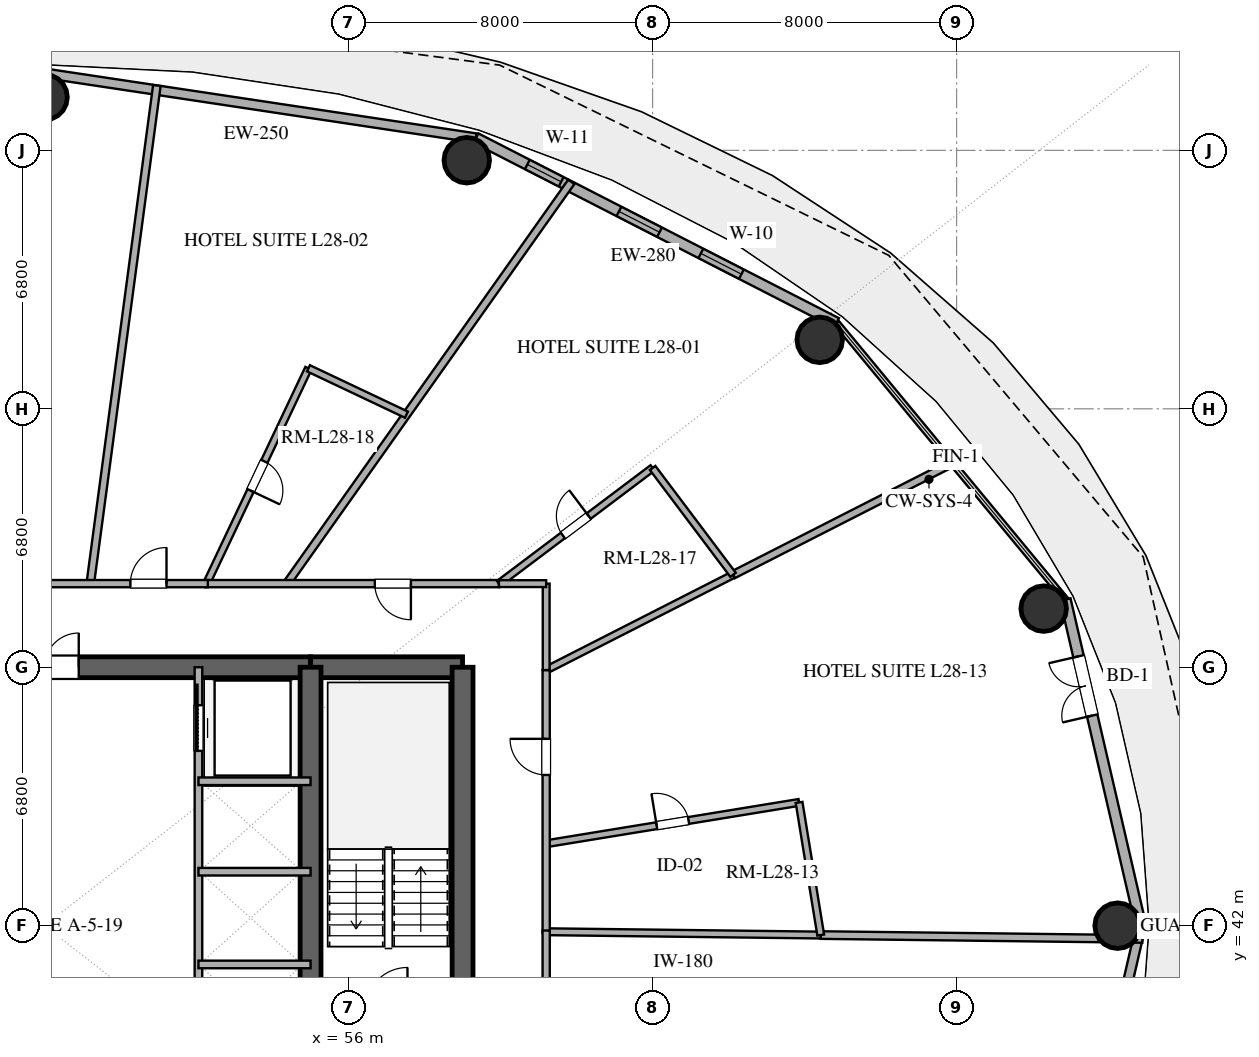
"""IFC4 building model, lengths in metres.
Left out: names, types, materials, properties, quantities, classifications, styles, units other than length and angle.
Written with IfcOpenShell. Run it as: python <this file> out.ifc"""

import sys

from ifc_helpers import new_model, si_unit, direction, frame, frame_2d, origin, origin_2d, place, context, subcontext, project, spatial, rectangle, hollow_circle, extrude, element, fill, save


model = new_model("IFC4")
c1 = context("Model", 3, precision=1e-05, world=origin(), true_north=direction((0.0, 1.0)))
c2 = subcontext(c1, "Body", "Model", "MODEL_VIEW")
j1 = project(units=[si_unit("LENGTHUNIT", "METRE"), si_unit("PLANEANGLEUNIT", "RADIAN")], contexts=[c1])
p1 = place(None, origin())
s1 = spatial("IfcSite", under=j1, at=p1, CompositionType="ELEMENT")
p2 = place(p1, origin())
s2 = spatial("IfcBuilding", under=s1, at=p2, CompositionType="ELEMENT")
p3 = place(p2, frame((0.0, 0.0, 112.8)))
s3 = spatial("IfcBuildingStorey", under=s2, at=p3, CompositionType="ELEMENT", Elevation=112.8)
p4 = place(p3, frame((41.0, 48.8, 0.0), z_axis=(0.0, 0.0, 1.0), x_axis=(1.0, 0.0, 0.0)))
e1 = element("IfcWall", 1, at=p4, inside=s3, PredefinedType="SHEAR", context=c2, shape_type="SweptSolid", body=[
    extrude(rectangle(XDim=14.0, YDim=0.55, at=frame_2d((7.0, 0.0))), origin(), (0.0, 0.0, 1.0), 3.38),
])
p5 = place(p4, frame((6.1, 0.0, 0.0)))
e2 = element("IfcOpeningElement", 2, at=p5, cuts=e1, PredefinedType="OPENING", context=c2, shape_type="SweptSolid", body=[
    extrude(rectangle(XDim=1.8, YDim=2.25, at=frame_2d((0.9, 1.125))), frame((0.0, 0.285, 0.0), z_axis=(0.0, -1.0, 0.0), x_axis=(1.0, 0.0, 0.0)), (0.0, 0.0, 1.0), 0.57),
])
p6 = place(p3, frame((55.0, 48.8, 0.0), z_axis=(0.0, 0.0, 1.0), x_axis=(1.0, 0.0, 0.0)))
e3 = element("IfcWall", 3, at=p6, inside=s3, PredefinedType="SHEAR", context=c2, shape_type="SweptSolid", body=[
    extrude(rectangle(XDim=4.0, YDim=0.55, at=frame_2d((2.0, 0.0))), origin(), (0.0, 0.0, 1.0), 3.38),
])
p7 = place(p3, frame((59.0, 35.2, 0.0), z_axis=(0.0, 0.0, 1.0), x_axis=(0.0, 1.0, 0.0)))
e4 = element("IfcWall", 4, at=p7, inside=s3, PredefinedType="SHEAR", context=c2, shape_type="SweptSolid", body=[
    extrude(rectangle(XDim=13.6, YDim=0.55, at=frame_2d((6.8, 0.0))), origin(), (0.0, 0.0, 1.0), 3.38),
])
p8 = place(p7, frame((1.5, 0.0, 0.0)))
e5 = element("IfcOpeningElement", 5, at=p8, cuts=e4, PredefinedType="OPENING", context=c2, shape_type="SweptSolid", body=[
    extrude(rectangle(XDim=1.2, YDim=2.15, at=frame_2d((0.6, 1.075))), frame((0.0, 0.285, 0.0), z_axis=(0.0, -1.0, 0.0), x_axis=(1.0, 0.0, 0.0)), (0.0, 0.0, 1.0), 0.57),
])
p9 = place(p3, frame((55.0, 35.2, 0.0), z_axis=(0.0, 0.0, 1.0), x_axis=(0.0, 1.0, 0.0)))
e6 = element("IfcWall", 6, at=p9, inside=s3, PredefinedType="SHEAR", context=c2, shape_type="SweptSolid", body=[
    extrude(rectangle(XDim=13.6, YDim=0.55, at=frame_2d((6.8, 0.0))), origin(), (0.0, 0.0, 1.0), 3.38),
])
p10 = place(p9, frame((1.15, 0.0, 0.0)))
e7 = element("IfcOpeningElement", 7, at=p10, cuts=e6, PredefinedType="OPENING", context=c2, shape_type="SweptSolid", body=[
    extrude(rectangle(XDim=1.1, YDim=2.2, at=frame_2d((0.55, 1.1))), frame((0.0, 0.285, 0.0), z_axis=(0.0, -1.0, 0.0), x_axis=(1.0, 0.0, 0.0)), (0.0, 0.0, 1.0), 0.57),
])
for number, where, z_axis, x_axis in (
    (8, (76.237, 42.0, 0.0), (0.0, 0.0, 1.0), (1.0, 0.0, 0.0)),
    (9, (74.291, 50.343, 0.0), (0.0, 0.0, 1.0), (1.0, 0.0, 0.0)),
    (10, (68.398, 57.415, 0.0), (0.0, 0.0, 1.0), (1.0, 0.0, 0.0)),
    (11, (59.11, 62.141, 0.0), (0.0, 0.0, 1.0), (1.0, 0.0, 0.0)),
    (12, (48.0, 63.8, 0.0), (0.0, 0.0, 1.0), (1.0, 0.0, 0.0)),
):
    element("IfcColumn", number, at=place(p3, frame(where, z_axis=z_axis, x_axis=x_axis)), inside=s3, PredefinedType="COLUMN", context=c2, shape_type="SweptSolid", body=[
        extrude(hollow_circle(Radius=0.6, WallThickness=0.032, at=origin_2d()), origin(), (0.0, 0.0, 1.0), 3.38),
    ])
p11 = place(p3, frame((76.849, 42.0, 0.0), z_axis=(0.0, 0.0, 1.0), x_axis=(-0.22558597182, 0.974223264616, 0.0)))
e13 = element("IfcWall", 13, at=p11, inside=s3, PredefinedType="SOLIDWALL", context=c2, shape_type="SweptSolid", body=[
    extrude(rectangle(XDim=8.811, YDim=0.28, at=frame_2d((4.405, 0.0))), origin(), (0.0, 0.0, 1.0), 3.38),
])
p12 = place(p11, frame((5.675, 0.0, 0.0)))
e14 = element("IfcOpeningElement", 14, at=p12, cuts=e13, PredefinedType="OPENING", context=c2, shape_type="SweptSolid", body=[
    extrude(rectangle(XDim=1.6, YDim=2.25, at=frame_2d((0.8, 1.125))), frame((0.0, 0.15, 0.0), z_axis=(0.0, -1.0, 0.0), x_axis=(1.0, 0.0, 0.0)), (0.0, 0.0, 1.0), 0.3),
])
p13 = place(p3, frame((68.84, 57.86, 0.0), z_axis=(0.0, 0.0, 1.0), x_axis=(-0.889959505023, 0.45603955905, 0.0)))
e15 = element("IfcWall", 15, at=p13, inside=s3, PredefinedType="SOLIDWALL", context=c2, shape_type="SweptSolid", body=[
    extrude(rectangle(XDim=10.662, YDim=0.28, at=frame_2d((5.331, 0.0))), origin(), (0.0, 0.0, 1.0), 3.38),
])
p14 = place(p13, frame((2.811, 0.0, 0.85)))
e16 = element("IfcOpeningElement", 16, at=p14, cuts=e15, PredefinedType="OPENING", context=c2, shape_type="SweptSolid", body=[
    extrude(rectangle(XDim=1.2, YDim=1.6, at=frame_2d((0.6, 0.8))), frame((0.0, 0.15, 0.0), z_axis=(0.0, -1.0, 0.0), x_axis=(1.0, 0.0, 0.0)), (0.0, 0.0, 1.0), 0.3),
])
p15 = place(p13, frame((5.232, 0.0, 0.85)))
e17 = element("IfcOpeningElement", 17, at=p15, cuts=e15, PredefinedType="OPENING", context=c2, shape_type="SweptSolid", body=[
    extrude(rectangle(XDim=1.2, YDim=1.6, at=frame_2d((0.6, 0.8))), frame((0.0, 0.15, 0.0), z_axis=(0.0, -1.0, 0.0), x_axis=(1.0, 0.0, 0.0)), (0.0, 0.0, 1.0), 0.3),
])
p16 = place(p13, frame((8.142, 0.0, 0.85)))
e18 = element("IfcOpeningElement", 18, at=p16, cuts=e15, PredefinedType="OPENING", context=c2, shape_type="SweptSolid", body=[
    extrude(rectangle(XDim=1.0, YDim=1.8, at=frame_2d((0.5, 0.9))), frame((0.0, 0.15, 0.0), z_axis=(0.0, -1.0, 0.0), x_axis=(1.0, 0.0, 0.0)), (0.0, 0.0, 1.0), 0.3),
])
p17 = place(p3, frame((59.351, 62.723, 0.0), z_axis=(0.0, 0.0, 1.0), x_axis=(-0.988877774656, 0.148730450117, 0.0)))
e19 = element("IfcWall", 19, at=p17, inside=s3, PredefinedType="SOLIDWALL", context=c2, shape_type="SweptSolid", body=[
    extrude(rectangle(XDim=11.479, YDim=0.25, at=frame_2d((5.74, 0.0))), origin(), (0.0, 0.0, 1.0), 3.38),
])
p18 = place(p3, frame((74.861, 33.417, 0.0), z_axis=(0.0, 0.0, 1.0), x_axis=(0.22558597182, 0.974223264616, 0.0)))
e20 = element("IfcWall", 20, at=p18, inside=s3, PredefinedType="SOLIDWALL", context=c2, shape_type="SweptSolid", body=[
    extrude(rectangle(XDim=8.811, YDim=0.25, at=frame_2d((4.405, 0.0))), origin(), (0.0, 0.0, 1.0), 3.38),
])
p19 = place(p3, frame((52.05, 38.4, 0.0), z_axis=(0.0, 0.0, 1.0), x_axis=(0.0, 1.0, 0.0)))
e21 = element("IfcWall", 21, at=p19, inside=s3, PredefinedType="SOLIDWALL", context=c2, shape_type="SweptSolid", body=[
    extrude(rectangle(XDim=10.4, YDim=0.2, at=frame_2d((5.2, 0.0))), origin(), (0.0, 0.0, 1.0), 2.74),
])
p20 = place(p19, frame((8.2, 0.0, 0.0)))
e22 = element("IfcOpeningElement", 22, at=p20, cuts=e21, PredefinedType="OPENING", context=c2, shape_type="SweptSolid", body=[
    extrude(rectangle(XDim=1.2, YDim=2.2, at=frame_2d((0.6, 1.1))), frame((0.0, 0.11, 0.0), z_axis=(0.0, -1.0, 0.0), x_axis=(1.0, 0.0, 0.0)), (0.0, 0.0, 1.0), 0.22),
])
for number, where, z_axis, x_axis in (
    (23, (52.05, 40.98, 0.0), (0.0, 0.0, 1.0), (1.0, 0.0, 0.0)),
    (24, (52.05, 43.42, 0.0), (0.0, 0.0, 1.0), (1.0, 0.0, 0.0)),
    (25, (52.05, 45.8, 0.0), (0.0, 0.0, 1.0), (1.0, 0.0, 0.0)),
):
    element("IfcWall", number, at=place(p3, frame(where, z_axis=z_axis, x_axis=x_axis)), inside=s3, PredefinedType="SOLIDWALL", context=c2, shape_type="SweptSolid", body=[
        extrude(rectangle(XDim=2.95, YDim=0.2, at=frame_2d((1.475, 0.0))), origin(), (0.0, 0.0, 1.0), 2.74),
    ])
p21 = place(p3, frame((50.956, 64.107, 0.0), z_axis=(0.0, 0.0, 1.0), x_axis=(-0.132526518831, -0.99117945994, 0.0)))
e26 = element("IfcWall", 26, at=p21, inside=s3, PredefinedType="PARTITIONING", context=c2, shape_type="SweptSolid", body=[
    extrude(rectangle(XDim=13.223, YDim=0.2, at=frame_2d((6.612, 0.0))), origin(), (0.0, 0.0, 1.0), 2.74),
])
p22 = place(p3, frame((76.888, 41.651, 0.0), z_axis=(0.0, 0.0, 1.0), x_axis=(-0.9999269672, 0.012085539541, 0.0)))
e27 = element("IfcWall", 27, at=p22, inside=s3, PredefinedType="PARTITIONING", context=c2, shape_type="SweptSolid", body=[
    extrude(rectangle(XDim=8.464, YDim=0.2, at=frame_2d((4.232, 0.0))), origin(), (0.0, 0.0, 1.0), 2.74),
])
p23 = place(p3, frame((54.374, 51.0, 0.0), z_axis=(0.0, 0.0, 1.0), x_axis=(0.577967135411, 0.816060040919, 0.0)))
e28 = element("IfcWall", 28, at=p23, inside=s3, PredefinedType="PARTITIONING", context=c2, shape_type="SweptSolid", body=[
    extrude(rectangle(XDim=12.953, YDim=0.2, at=frame_2d((6.477, 0.0))), origin(), (0.0, 0.0, 1.0), 2.74),
])
p24 = place(p3, frame((68.425, 41.753, 0.0), z_axis=(0.0, 0.0, 1.0), x_axis=(-0.999926833816, 0.012096570355, 0.0)))
e29 = element("IfcWall", 29, at=p24, inside=s3, PredefinedType="PLUMBINGWALL", context=c2, shape_type="SweptSolid", body=[
    extrude(rectangle(XDim=7.225, YDim=0.18, at=frame_2d((3.613, 0.0))), origin(), (0.0, 0.0, 1.0), 2.74),
])
p25 = place(p3, frame((61.2, 44.156, 0.0), z_axis=(0.0, 0.0, 1.0), x_axis=(0.986917247844, 0.161227621419, 0.0)))
e30 = element("IfcWall", 30, at=p25, inside=s3, PredefinedType="PLUMBINGWALL", context=c2, shape_type="SweptSolid", body=[
    extrude(rectangle(XDim=6.743, YDim=0.18, at=frame_2d((3.372, 0.0))), origin(), (0.0, 0.0, 1.0), 2.74),
])
p26 = place(p25, frame((2.946, 0.0, 0.0)))
e31 = element("IfcOpeningElement", 31, at=p26, cuts=e30, PredefinedType="OPENING", context=c2, shape_type="SweptSolid", body=[
    extrude(rectangle(XDim=0.85, YDim=2.1, at=frame_2d((0.425, 1.05))), frame((0.0, 0.1, 0.0), z_axis=(0.0, -1.0, 0.0), x_axis=(1.0, 0.0, 0.0)), (0.0, 0.0, 1.0), 0.2),
])
p27 = place(p3, frame((71.998, 54.228, 0.0), z_axis=(0.0, 0.0, 1.0), x_axis=(-0.891005333778, -0.453992836044, 0.0)))
e32 = element("IfcWall", 32, at=p27, inside=s3, PredefinedType="PARTITIONING", context=c2, shape_type="SweptSolid", body=[
    extrude(rectangle(XDim=6.599, YDim=0.2, at=frame_2d((3.3, 0.0))), origin(), (0.0, 0.0, 1.0), 2.74),
])
p28 = place(p3, frame((54.945, 56.666, 0.0), z_axis=(0.0, 0.0, 1.0), x_axis=(-0.427935680108, -0.903809190975, 0.0)))
e33 = element("IfcWall", 33, at=p28, inside=s3, PredefinedType="PLUMBINGWALL", context=c2, shape_type="SweptSolid", body=[
    extrude(rectangle(XDim=6.269, YDim=0.18, at=frame_2d((3.135, 0.0))), origin(), (0.0, 0.0, 1.0), 2.74),
])
p29 = place(p28, frame((2.71, 0.0, 0.0)))
e34 = element("IfcOpeningElement", 34, at=p29, cuts=e33, PredefinedType="OPENING", context=c2, shape_type="SweptSolid", body=[
    extrude(rectangle(XDim=0.85, YDim=2.1, at=frame_2d((0.425, 1.05))), frame((0.0, 0.1, 0.0), z_axis=(0.0, -1.0, 0.0), x_axis=(1.0, 0.0, 0.0)), (0.0, 0.0, 1.0), 0.2),
])
p30 = place(p3, frame((59.957, 51.0, 0.0), z_axis=(0.0, 0.0, 1.0), x_axis=(-1.0, 0.0, 0.0)))
e35 = element("IfcWall", 35, at=p30, inside=s3, PredefinedType="PARTITIONING", context=c2, shape_type="SweptSolid", body=[
    extrude(rectangle(XDim=7.73, YDim=0.19, at=frame_2d((3.865, 0.0))), origin(), (0.0, 0.0, 1.0), 2.74),
])
p31 = place(p30, frame((2.316, 0.0, 0.0)))
e36 = element("IfcOpeningElement", 36, at=p31, cuts=e35, PredefinedType="OPENING", context=c2, shape_type="SweptSolid", body=[
    extrude(rectangle(XDim=0.95, YDim=2.15, at=frame_2d((0.475, 1.075))), frame((0.0, 0.105, 0.0), z_axis=(0.0, -1.0, 0.0), x_axis=(1.0, 0.0, 0.0)), (0.0, 0.0, 1.0), 0.21),
])
p32 = place(p3, frame((66.118, 51.231, 0.0), z_axis=(0.0, 0.0, 1.0), x_axis=(-0.891004388837, -0.453994690579, 0.0)))
e37 = element("IfcWall", 37, at=p32, inside=s3, PredefinedType="PLUMBINGWALL", context=c2, shape_type="SweptSolid", body=[
    extrude(rectangle(XDim=5.52, YDim=0.18, at=frame_2d((2.76, 0.0))), origin(), (0.0, 0.0, 1.0), 2.74),
])
p33 = place(p3, frame((59.957, 51.0, 0.0), z_axis=(0.0, 0.0, 1.0), x_axis=(0.798951197172, 0.601395863419, 0.0)))
e38 = element("IfcWall", 38, at=p33, inside=s3, PredefinedType="PLUMBINGWALL", context=c2, shape_type="SweptSolid", body=[
    extrude(rectangle(XDim=5.062, YDim=0.18, at=frame_2d((2.531, 0.0))), origin(), (0.0, 0.0, 1.0), 2.74),
])
p34 = place(p33, frame((2.106, 0.0, 0.0)))
e39 = element("IfcOpeningElement", 39, at=p34, cuts=e38, PredefinedType="OPENING", context=c2, shape_type="SweptSolid", body=[
    extrude(rectangle(XDim=0.85, YDim=2.1, at=frame_2d((0.425, 1.05))), frame((0.0, 0.1, 0.0), z_axis=(0.0, -1.0, 0.0), x_axis=(1.0, 0.0, 0.0)), (0.0, 0.0, 1.0), 0.2),
])
p35 = place(p3, frame((61.2, 41.809, 0.0), z_axis=(0.0, 0.0, 1.0), x_axis=(0.0, 1.0, 0.0)))
e40 = element("IfcWall", 40, at=p35, inside=s3, PredefinedType="PARTITIONING", context=c2, shape_type="SweptSolid", body=[
    extrude(rectangle(XDim=6.917, YDim=0.19, at=frame_2d((3.458, 0.0))), origin(), (0.0, 0.0, 1.0), 2.74),
])
p36 = place(p35, frame((4.157, 0.0, 0.0)))
e41 = element("IfcOpeningElement", 41, at=p36, cuts=e40, PredefinedType="OPENING", context=c2, shape_type="SweptSolid", body=[
    extrude(rectangle(XDim=0.95, YDim=2.15, at=frame_2d((0.475, 1.075))), frame((0.0, 0.105, 0.0), z_axis=(0.0, -1.0, 0.0), x_axis=(1.0, 0.0, 0.0)), (0.0, 0.0, 1.0), 0.21),
])
p37 = place(p3, frame((44.677, 51.0, 0.0), z_axis=(0.0, 0.0, 1.0), x_axis=(1.0, 0.0, 0.0)))
e42 = element("IfcWall", 42, at=p37, inside=s3, PredefinedType="PARTITIONING", context=c2, shape_type="SweptSolid", body=[
    extrude(rectangle(XDim=7.621, YDim=0.19, at=frame_2d((3.81, 0.0))), origin(), (0.0, 0.0, 1.0), 2.74),
])
p38 = place(p37, frame((1.78, 0.0, 0.0)))
e43 = element("IfcOpeningElement", 43, at=p38, cuts=e42, PredefinedType="OPENING", context=c2, shape_type="SweptSolid", body=[
    extrude(rectangle(XDim=1.0, YDim=2.2, at=frame_2d((0.5, 1.1))), frame((0.0, 0.105, 0.0), z_axis=(0.0, -1.0, 0.0), x_axis=(1.0, 0.0, 0.0)), (0.0, 0.0, 1.0), 0.21),
])
p39 = place(p37, frame((5.583, 0.0, 0.0)))
e44 = element("IfcOpeningElement", 44, at=p39, cuts=e42, PredefinedType="OPENING", context=c2, shape_type="SweptSolid", body=[
    extrude(rectangle(XDim=0.95, YDim=2.15, at=frame_2d((0.475, 1.075))), frame((0.0, 0.105, 0.0), z_axis=(0.0, -1.0, 0.0), x_axis=(1.0, 0.0, 0.0)), (0.0, 0.0, 1.0), 0.21),
])
p40 = place(p3, frame((61.2, 41.873, 0.0), z_axis=(0.0, 0.0, 1.0), x_axis=(0.0, -1.0, 0.0)))
e45 = element("IfcWall", 45, at=p40, inside=s3, PredefinedType="PARTITIONING", context=c2, shape_type="SweptSolid", body=[
    extrude(rectangle(XDim=8.873, YDim=0.19, at=frame_2d((4.436, 0.0))), origin(), (0.0, 0.0, 1.0), 2.74),
])
p41 = place(p40, frame((1.676, 0.0, 0.0)))
e46 = element("IfcOpeningElement", 46, at=p41, cuts=e45, PredefinedType="OPENING", context=c2, shape_type="SweptSolid", body=[
    extrude(rectangle(XDim=0.95, YDim=2.15, at=frame_2d((0.475, 1.075))), frame((0.0, 0.105, 0.0), z_axis=(0.0, -1.0, 0.0), x_axis=(1.0, 0.0, 0.0)), (0.0, 0.0, 1.0), 0.21),
])
p42 = place(p3, frame((67.855, 45.243, 0.0), z_axis=(0.0, 0.0, 1.0), x_axis=(0.161207379819, -0.986920554397, 0.0)))
e47 = element("IfcWall", 47, at=p42, inside=s3, PredefinedType="PLUMBINGWALL", context=c2, shape_type="SweptSolid", body=[
    extrude(rectangle(XDim=3.536, YDim=0.18, at=frame_2d((1.768, 0.0))), origin(), (0.0, 0.0, 1.0), 2.74),
])
p43 = place(p3, frame((64.001, 54.044, 0.0), z_axis=(0.0, 0.0, 1.0), x_axis=(0.601341788725, -0.79899189804, 0.0)))
e48 = element("IfcWall", 48, at=p43, inside=s3, PredefinedType="PLUMBINGWALL", context=c2, shape_type="SweptSolid", body=[
    extrude(rectangle(XDim=3.52, YDim=0.18, at=frame_2d((1.76, 0.0))), origin(), (0.0, 0.0, 1.0), 2.74),
])
p44 = place(p3, frame((57.523, 55.446, 0.0), z_axis=(0.0, 0.0, 1.0), x_axis=(-0.90380753646, 0.42793917446, 0.0)))
e49 = element("IfcWall", 49, at=p44, inside=s3, PredefinedType="PLUMBINGWALL", context=c2, shape_type="SweptSolid", body=[
    extrude(rectangle(XDim=2.853, YDim=0.18, at=frame_2d((1.426, 0.0))), origin(), (0.0, 0.0, 1.0), 2.74),
])
p45 = place(p3, frame((61.2, 48.726, 0.0), z_axis=(0.0, 0.0, 1.0), x_axis=(0.0, 1.0, 0.0)))
e50 = element("IfcWall", 50, at=p45, inside=s3, PredefinedType="PLUMBINGWALL", context=c2, shape_type="SweptSolid", body=[
    extrude(rectangle(XDim=2.274, YDim=0.18, at=frame_2d((1.137, 0.0))), origin(), (0.0, 0.0, 1.0), 2.74),
])
p46 = place(p3, frame((61.2, 51.0, 0.0), z_axis=(0.0, 0.0, 1.0), x_axis=(-1.0, 0.0, 0.0)))
e51 = element("IfcWall", 51, at=p46, inside=s3, PredefinedType="PLUMBINGWALL", context=c2, shape_type="SweptSolid", body=[
    extrude(rectangle(XDim=1.243, YDim=0.18, at=frame_2d((0.622, 0.0))), origin(), (0.0, 0.0, 1.0), 2.74),
])
p47 = place(p12, origin())
e52 = element("IfcDoor", 52, at=p47, inside=s3, OperationType="DOUBLE_DOOR_SINGLE_SWING", PredefinedType="DOOR", context=c2, shape_type="SweptSolid", body=[
    extrude(rectangle(XDim=1.6, YDim=2.25, at=frame_2d((0.8, 1.125))), frame((0.0, 0.025, 0.0), z_axis=(0.0, -1.0, 0.0), x_axis=(1.0, 0.0, 0.0)), (0.0, 0.0, 1.0), 0.05),
])
fill(e14, e52)
p48 = place(p14, origin())
e53 = element("IfcWindow", 53, at=p48, inside=s3, PartitioningType="SINGLE_PANEL", PredefinedType="WINDOW", context=c2, shape_type="SweptSolid", body=[
    extrude(rectangle(XDim=1.2, YDim=1.6, at=frame_2d((0.6, 0.8))), frame((0.0, 0.03, 0.0), z_axis=(0.0, -1.0, 0.0), x_axis=(1.0, 0.0, 0.0)), (0.0, 0.0, 1.0), 0.06),
])
fill(e16, e53)
p49 = place(p15, origin())
e54 = element("IfcWindow", 54, at=p49, inside=s3, PartitioningType="SINGLE_PANEL", PredefinedType="WINDOW", context=c2, shape_type="SweptSolid", body=[
    extrude(rectangle(XDim=1.2, YDim=1.6, at=frame_2d((0.6, 0.8))), frame((0.0, 0.03, 0.0), z_axis=(0.0, -1.0, 0.0), x_axis=(1.0, 0.0, 0.0)), (0.0, 0.0, 1.0), 0.06),
])
fill(e17, e54)
p50 = place(p16, origin())
e55 = element("IfcWindow", 55, at=p50, inside=s3, PartitioningType="SINGLE_PANEL", PredefinedType="WINDOW", context=c2, shape_type="SweptSolid", body=[
    extrude(rectangle(XDim=1.0, YDim=1.8, at=frame_2d((0.5, 0.9))), frame((0.0, 0.03, 0.0), z_axis=(0.0, -1.0, 0.0), x_axis=(1.0, 0.0, 0.0)), (0.0, 0.0, 1.0), 0.06),
])
fill(e18, e55)
p51 = place(p5, origin())
e56 = element("IfcDoor", 56, at=p51, inside=s3, OperationType="DOUBLE_DOOR_SINGLE_SWING", PredefinedType="DOOR", context=c2, shape_type="SweptSolid", body=[
    extrude(rectangle(XDim=1.8, YDim=2.25, at=frame_2d((0.9, 1.125))), frame((0.0, 0.025, 0.0), z_axis=(0.0, -1.0, 0.0), x_axis=(1.0, 0.0, 0.0)), (0.0, 0.0, 1.0), 0.05),
])
fill(e2, e56)
p52 = place(p20, origin())
e57 = element("IfcDoor", 57, at=p52, inside=s3, OperationType="SLIDING_TO_RIGHT", PredefinedType="DOOR", context=c2, shape_type="SweptSolid", body=[
    extrude(rectangle(XDim=1.2, YDim=2.2, at=frame_2d((0.6, 1.1))), frame((0.0, 0.025, 0.0), z_axis=(0.0, -1.0, 0.0), x_axis=(1.0, 0.0, 0.0)), (0.0, 0.0, 1.0), 0.05),
])
fill(e22, e57)
p53 = place(p26, origin())
e58 = element("IfcDoor", 58, at=p53, inside=s3, OperationType="SINGLE_SWING_LEFT", PredefinedType="DOOR", context=c2, shape_type="SweptSolid", body=[
    extrude(rectangle(XDim=0.85, YDim=2.1, at=frame_2d((0.425, 1.05))), frame((0.0, 0.025, 0.0), z_axis=(0.0, -1.0, 0.0), x_axis=(1.0, 0.0, 0.0)), (0.0, 0.0, 1.0), 0.05),
])
fill(e31, e58)
p54 = place(p29, origin())
e59 = element("IfcDoor", 59, at=p54, inside=s3, OperationType="SINGLE_SWING_RIGHT", PredefinedType="DOOR", context=c2, shape_type="SweptSolid", body=[
    extrude(rectangle(XDim=0.85, YDim=2.1, at=frame_2d((0.425, 1.05))), frame((0.0, 0.025, 0.0), z_axis=(0.0, -1.0, 0.0), x_axis=(1.0, 0.0, 0.0)), (0.0, 0.0, 1.0), 0.05),
])
fill(e34, e59)
p55 = place(p31, origin())
e60 = element("IfcDoor", 60, at=p55, inside=s3, OperationType="SINGLE_SWING_LEFT", PredefinedType="DOOR", context=c2, shape_type="SweptSolid", body=[
    extrude(rectangle(XDim=0.95, YDim=2.15, at=frame_2d((0.475, 1.075))), frame((0.0, 0.025, 0.0), z_axis=(0.0, -1.0, 0.0), x_axis=(1.0, 0.0, 0.0)), (0.0, 0.0, 1.0), 0.05),
])
fill(e36, e60)
p56 = place(p34, origin())
e61 = element("IfcDoor", 61, at=p56, inside=s3, OperationType="SINGLE_SWING_RIGHT", PredefinedType="DOOR", context=c2, shape_type="SweptSolid", body=[
    extrude(rectangle(XDim=0.85, YDim=2.1, at=frame_2d((0.425, 1.05))), frame((0.0, 0.025, 0.0), z_axis=(0.0, -1.0, 0.0), x_axis=(1.0, 0.0, 0.0)), (0.0, 0.0, 1.0), 0.05),
])
fill(e39, e61)
p57 = place(p36, origin())
e62 = element("IfcDoor", 62, at=p57, inside=s3, OperationType="SINGLE_SWING_RIGHT", PredefinedType="DOOR", context=c2, shape_type="SweptSolid", body=[
    extrude(rectangle(XDim=0.95, YDim=2.15, at=frame_2d((0.475, 1.075))), frame((0.0, 0.025, 0.0), z_axis=(0.0, -1.0, 0.0), x_axis=(1.0, 0.0, 0.0)), (0.0, 0.0, 1.0), 0.05),
])
fill(e41, e62)
p58 = place(p39, origin())
e63 = element("IfcDoor", 63, at=p58, inside=s3, OperationType="SINGLE_SWING_RIGHT", PredefinedType="DOOR", context=c2, shape_type="SweptSolid", body=[
    extrude(rectangle(XDim=0.95, YDim=2.15, at=frame_2d((0.475, 1.075))), frame((0.0, 0.025, 0.0), z_axis=(0.0, -1.0, 0.0), x_axis=(1.0, 0.0, 0.0)), (0.0, 0.0, 1.0), 0.05),
])
fill(e44, e63)
save(model, sys.argv[1])
